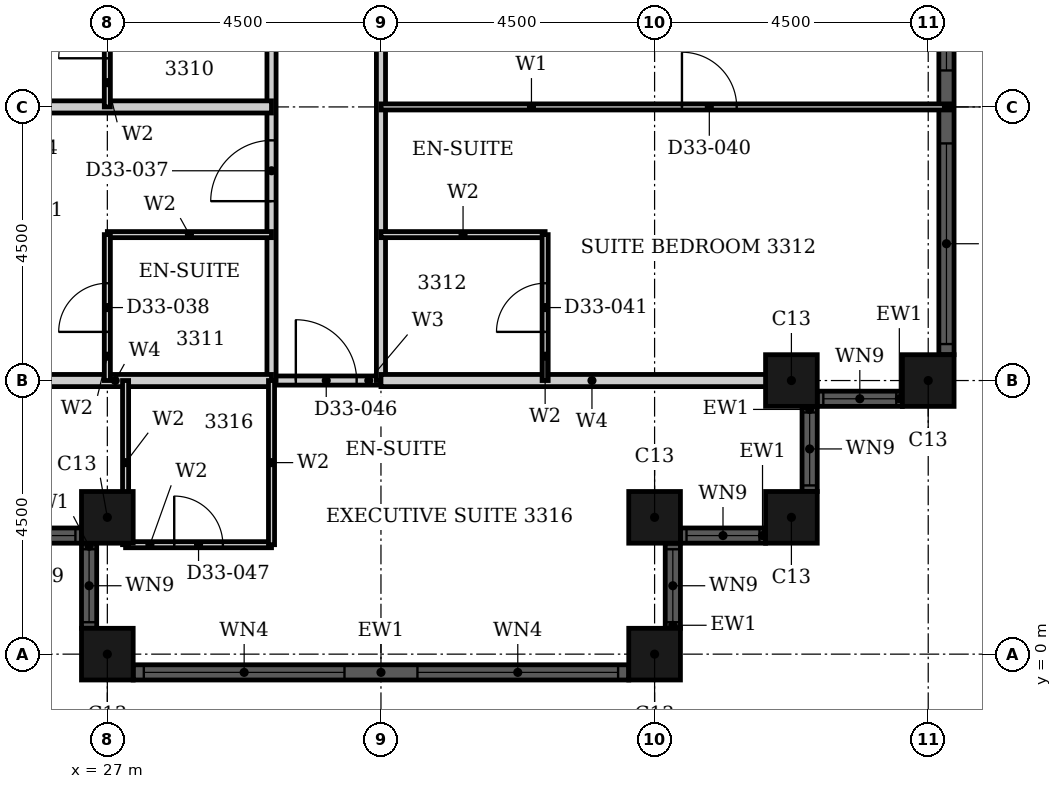
"""IFC4 building model, lengths in metres.
Left out: names, types, materials, properties, quantities, classifications, styles, units other than length and angle.
Written with IfcOpenShell. Run it as: python <this file> out.ifc"""

import sys

from ifc_helpers import new_model, si_unit, direction, frame, frame_2d, origin, origin_2d, place, context, subcontext, project, spatial, rectangle, hollow_rectangle, extrude, element, fill, save


model = new_model("IFC4")
c1 = context("Model", 3, precision=1e-05, world=origin(), true_north=direction((0.0, 1.0)))
c2 = subcontext(c1, "Body", "Model", "MODEL_VIEW")
j1 = project(units=[si_unit("LENGTHUNIT", "METRE"), si_unit("PLANEANGLEUNIT", "RADIAN")], contexts=[c1])
p1 = place(None, origin())
s1 = spatial("IfcSite", under=j1, at=p1, CompositionType="ELEMENT")
p2 = place(p1, origin())
s2 = spatial("IfcBuilding", under=s1, at=p2, CompositionType="ELEMENT")
p3 = place(p2, frame((0.0, 0.0, 133.2)))
s3 = spatial("IfcBuildingStorey", under=s2, at=p3, CompositionType="ELEMENT", Elevation=133.2)
for number, where, z_axis, x_axis in (
    (1, (27.0, 2.25, 0.0), (0.0, 0.0, 1.0), (1.0, 0.0, 0.0)),
    (2, (27.0, 0.0, 0.0), (0.0, 0.0, 1.0), (1.0, 0.0, 0.0)),
    (3, (36.0, 0.0, 0.0), (0.0, 0.0, 1.0), (1.0, 0.0, 0.0)),
    (4, (36.0, 2.25, 0.0), (0.0, 0.0, 1.0), (1.0, 0.0, 0.0)),
    (5, (38.25, 2.25, 0.0), (0.0, 0.0, 1.0), (1.0, 0.0, 0.0)),
    (6, (38.25, 4.5, 0.0), (0.0, 0.0, 1.0), (1.0, 0.0, 0.0)),
    (7, (40.5, 4.5, 0.0), (0.0, 0.0, 1.0), (1.0, 0.0, 0.0)),
):
    element("IfcColumn", number, at=place(p3, frame(where, z_axis=z_axis, x_axis=x_axis)), inside=s3, PredefinedType="COLUMN", context=c2, shape_type="SweptSolid", body=[
        extrude(hollow_rectangle(XDim=0.85, YDim=0.85, WallThickness=0.026, at=origin_2d()), origin(), (0.0, 0.0, 1.0), 3.6),
    ])
p4 = place(p3, frame((25.175, 1.95, 0.0), z_axis=(0.0, 0.0, 1.0), x_axis=(1.0, 0.0, 0.0)))
e8 = element("IfcWall", 8, at=p4, inside=s3, PredefinedType="SOLIDWALL", context=c2, shape_type="SweptSolid", body=[
    extrude(rectangle(XDim=1.4, YDim=0.25, at=frame_2d((0.7, 0.0))), origin(), (0.0, 0.0, 1.0), 3.6),
])
p5 = place(p4, frame((0.1, 0.0, 0.9)))
e9 = element("IfcOpeningElement", 9, at=p5, cuts=e8, PredefinedType="OPENING", context=c2, shape_type="SweptSolid", body=[
    extrude(rectangle(XDim=1.2, YDim=2.08, at=frame_2d((0.6, 1.04))), frame((0.0, 0.135, 0.0), z_axis=(0.0, -1.0, 0.0), x_axis=(1.0, 0.0, 0.0)), (0.0, 0.0, 1.0), 0.27),
])
p6 = place(p3, frame((26.7, 1.825, 0.0), z_axis=(0.0, 0.0, 1.0), x_axis=(0.0, -1.0, 0.0)))
e10 = element("IfcWall", 10, at=p6, inside=s3, PredefinedType="SOLIDWALL", context=c2, shape_type="SweptSolid", body=[
    extrude(rectangle(XDim=1.4, YDim=0.25, at=frame_2d((0.7, 0.0))), origin(), (0.0, 0.0, 1.0), 3.6),
])
p7 = place(p6, frame((0.1, 0.0, 0.9)))
e11 = element("IfcOpeningElement", 11, at=p7, cuts=e10, PredefinedType="OPENING", context=c2, shape_type="SweptSolid", body=[
    extrude(rectangle(XDim=1.2, YDim=2.08, at=frame_2d((0.6, 1.04))), frame((0.0, 0.135, 0.0), z_axis=(0.0, -1.0, 0.0), x_axis=(1.0, 0.0, 0.0)), (0.0, 0.0, 1.0), 0.27),
])
p8 = place(p3, frame((27.425, -0.3, 0.0), z_axis=(0.0, 0.0, 1.0), x_axis=(1.0, 0.0, 0.0)))
e12 = element("IfcWall", 12, at=p8, inside=s3, PredefinedType="SOLIDWALL", context=c2, shape_type="SweptSolid", body=[
    extrude(rectangle(XDim=8.15, YDim=0.25, at=frame_2d((4.075, 0.0))), origin(), (0.0, 0.0, 1.0), 3.6),
])
p9 = place(p8, frame((0.175, 0.0, 0.9)))
e13 = element("IfcOpeningElement", 13, at=p9, cuts=e12, PredefinedType="OPENING", context=c2, shape_type="SweptSolid", body=[
    extrude(rectangle(XDim=3.3, YDim=2.08, at=frame_2d((1.65, 1.04))), frame((0.0, 0.135, 0.0), z_axis=(0.0, -1.0, 0.0), x_axis=(1.0, 0.0, 0.0)), (0.0, 0.0, 1.0), 0.27),
])
p10 = place(p8, frame((4.675, 0.0, 0.9)))
e14 = element("IfcOpeningElement", 14, at=p10, cuts=e12, PredefinedType="OPENING", context=c2, shape_type="SweptSolid", body=[
    extrude(rectangle(XDim=3.3, YDim=2.08, at=frame_2d((1.65, 1.04))), frame((0.0, 0.135, 0.0), z_axis=(0.0, -1.0, 0.0), x_axis=(1.0, 0.0, 0.0)), (0.0, 0.0, 1.0), 0.27),
])
p11 = place(p3, frame((36.3, 0.425, 0.0), z_axis=(0.0, 0.0, 1.0), x_axis=(0.0, 1.0, 0.0)))
e15 = element("IfcWall", 15, at=p11, inside=s3, PredefinedType="SOLIDWALL", context=c2, shape_type="SweptSolid", body=[
    extrude(rectangle(XDim=1.4, YDim=0.25, at=frame_2d((0.7, 0.0))), origin(), (0.0, 0.0, 1.0), 3.6),
])
p12 = place(p11, frame((0.1, 0.0, 0.9)))
e16 = element("IfcOpeningElement", 16, at=p12, cuts=e15, PredefinedType="OPENING", context=c2, shape_type="SweptSolid", body=[
    extrude(rectangle(XDim=1.2, YDim=2.08, at=frame_2d((0.6, 1.04))), frame((0.0, 0.135, 0.0), z_axis=(0.0, -1.0, 0.0), x_axis=(1.0, 0.0, 0.0)), (0.0, 0.0, 1.0), 0.27),
])
p13 = place(p3, frame((36.425, 1.95, 0.0), z_axis=(0.0, 0.0, 1.0), x_axis=(1.0, 0.0, 0.0)))
e17 = element("IfcWall", 17, at=p13, inside=s3, PredefinedType="SOLIDWALL", context=c2, shape_type="SweptSolid", body=[
    extrude(rectangle(XDim=1.4, YDim=0.25, at=frame_2d((0.7, 0.0))), origin(), (0.0, 0.0, 1.0), 3.6),
])
p14 = place(p13, frame((0.1, 0.0, 0.9)))
e18 = element("IfcOpeningElement", 18, at=p14, cuts=e17, PredefinedType="OPENING", context=c2, shape_type="SweptSolid", body=[
    extrude(rectangle(XDim=1.2, YDim=2.08, at=frame_2d((0.6, 1.04))), frame((0.0, 0.135, 0.0), z_axis=(0.0, -1.0, 0.0), x_axis=(1.0, 0.0, 0.0)), (0.0, 0.0, 1.0), 0.27),
])
p15 = place(p3, frame((38.55, 2.675, 0.0), z_axis=(0.0, 0.0, 1.0), x_axis=(0.0, 1.0, 0.0)))
e19 = element("IfcWall", 19, at=p15, inside=s3, PredefinedType="SOLIDWALL", context=c2, shape_type="SweptSolid", body=[
    extrude(rectangle(XDim=1.4, YDim=0.25, at=frame_2d((0.7, 0.0))), origin(), (0.0, 0.0, 1.0), 3.6),
])
p16 = place(p15, frame((0.1, 0.0, 0.9)))
e20 = element("IfcOpeningElement", 20, at=p16, cuts=e19, PredefinedType="OPENING", context=c2, shape_type="SweptSolid", body=[
    extrude(rectangle(XDim=1.2, YDim=2.08, at=frame_2d((0.6, 1.04))), frame((0.0, 0.135, 0.0), z_axis=(0.0, -1.0, 0.0), x_axis=(1.0, 0.0, 0.0)), (0.0, 0.0, 1.0), 0.27),
])
p17 = place(p3, frame((38.675, 4.2, 0.0), z_axis=(0.0, 0.0, 1.0), x_axis=(1.0, 0.0, 0.0)))
e21 = element("IfcWall", 21, at=p17, inside=s3, PredefinedType="SOLIDWALL", context=c2, shape_type="SweptSolid", body=[
    extrude(rectangle(XDim=1.4, YDim=0.25, at=frame_2d((0.7, 0.0))), origin(), (0.0, 0.0, 1.0), 3.6),
])
p18 = place(p17, frame((0.1, 0.0, 0.9)))
e22 = element("IfcOpeningElement", 22, at=p18, cuts=e21, PredefinedType="OPENING", context=c2, shape_type="SweptSolid", body=[
    extrude(rectangle(XDim=1.2, YDim=2.08, at=frame_2d((0.6, 1.04))), frame((0.0, 0.135, 0.0), z_axis=(0.0, -1.0, 0.0), x_axis=(1.0, 0.0, 0.0)), (0.0, 0.0, 1.0), 0.27),
])
p19 = place(p3, frame((40.8, 4.925, 0.0), z_axis=(0.0, 0.0, 1.0), x_axis=(0.0, 1.0, 0.0)))
e23 = element("IfcWall", 23, at=p19, inside=s3, PredefinedType="SOLIDWALL", context=c2, shape_type="SweptSolid", body=[
    extrude(rectangle(XDim=8.15, YDim=0.25, at=frame_2d((4.075, 0.0))), origin(), (0.0, 0.0, 1.0), 3.6),
])
p20 = place(p19, frame((0.175, 0.0, 0.9)))
e24 = element("IfcOpeningElement", 24, at=p20, cuts=e23, PredefinedType="OPENING", context=c2, shape_type="SweptSolid", body=[
    extrude(rectangle(XDim=3.3, YDim=2.08, at=frame_2d((1.65, 1.04))), frame((0.0, 0.135, 0.0), z_axis=(0.0, -1.0, 0.0), x_axis=(1.0, 0.0, 0.0)), (0.0, 0.0, 1.0), 0.27),
])
p21 = place(p19, frame((4.675, 0.0, 0.9)))
e25 = element("IfcOpeningElement", 25, at=p21, cuts=e23, PredefinedType="OPENING", context=c2, shape_type="SweptSolid", body=[
    extrude(rectangle(XDim=3.3, YDim=2.08, at=frame_2d((1.65, 1.04))), frame((0.0, 0.135, 0.0), z_axis=(0.0, -1.0, 0.0), x_axis=(1.0, 0.0, 0.0)), (0.0, 0.0, 1.0), 0.27),
])
p22 = place(p3, frame((29.7, 4.5, 0.0), z_axis=(0.0, 0.0, 1.0), x_axis=(1.0, 0.0, 0.0)))
e26 = element("IfcWall", 26, at=p22, inside=s3, PredefinedType="PARTITIONING", context=c2, shape_type="SweptSolid", body=[
    extrude(rectangle(XDim=1.8, YDim=0.15, at=frame_2d((0.9, 0.0))), origin(), (0.0, 0.0, 1.0), 3.3),
])
p23 = place(p22, frame((0.4, 0.0, 0.0)))
e27 = element("IfcOpeningElement", 27, at=p23, cuts=e26, PredefinedType="OPENING", context=c2, shape_type="SweptSolid", body=[
    extrude(rectangle(XDim=1.0, YDim=2.1, at=frame_2d((0.5, 1.05))), frame((0.0, 0.085, 0.0), z_axis=(0.0, -1.0, 0.0), x_axis=(1.0, 0.0, 0.0)), (0.0, 0.0, 1.0), 0.17),
])
p24 = place(p3, frame((29.7, 4.5, 0.0), z_axis=(0.0, 0.0, 1.0), x_axis=(0.0, 1.0, 0.0)))
e28 = element("IfcWall", 28, at=p24, inside=s3, PredefinedType="PARTITIONING", context=c2, shape_type="SweptSolid", body=[
    extrude(rectangle(XDim=16.2, YDim=0.15, at=frame_2d((8.1, 0.0))), origin(), (0.0, 0.0, 1.0), 3.3),
])
p25 = place(p24, frame((7.45, 0.0, 0.0)))
e29 = element("IfcOpeningElement", 29, at=p25, cuts=e28, PredefinedType="OPENING", context=c2, shape_type="SweptSolid", body=[
    extrude(rectangle(XDim=1.0, YDim=2.1, at=frame_2d((0.5, 1.05))), frame((0.0, 0.085, 0.0), z_axis=(0.0, -1.0, 0.0), x_axis=(1.0, 0.0, 0.0)), (0.0, 0.0, 1.0), 0.17),
])
p26 = place(p24, frame((2.95, 0.0, 0.0)))
e30 = element("IfcOpeningElement", 30, at=p26, cuts=e28, PredefinedType="OPENING", context=c2, shape_type="SweptSolid", body=[
    extrude(rectangle(XDim=1.0, YDim=2.1, at=frame_2d((0.5, 1.05))), frame((0.0, 0.085, 0.0), z_axis=(0.0, -1.0, 0.0), x_axis=(1.0, 0.0, 0.0)), (0.0, 0.0, 1.0), 0.17),
])
p27 = place(p3, frame((31.5, 4.5, 0.0), z_axis=(0.0, 0.0, 1.0), x_axis=(0.0, 1.0, 0.0)))
e31 = element("IfcWall", 31, at=p27, inside=s3, PredefinedType="PARTITIONING", context=c2, shape_type="SweptSolid", body=[
    extrude(rectangle(XDim=16.2, YDim=0.15, at=frame_2d((8.1, 0.0))), origin(), (0.0, 0.0, 1.0), 2.58),
])
p28 = place(p27, frame((6.25, 0.0, 0.0)))
e32 = element("IfcOpeningElement", 32, at=p28, cuts=e31, PredefinedType="OPENING", context=c2, shape_type="SweptSolid", body=[
    extrude(rectangle(XDim=1.0, YDim=2.1, at=frame_2d((0.5, 1.05))), frame((0.0, 0.085, 0.0), z_axis=(0.0, -1.0, 0.0), x_axis=(1.0, 0.0, 0.0)), (0.0, 0.0, 1.0), 0.17),
])
p29 = place(p3, frame((31.5, 9.0, 0.0), z_axis=(0.0, 0.0, 1.0), x_axis=(1.0, 0.0, 0.0)))
e33 = element("IfcWall", 33, at=p29, inside=s3, PredefinedType="PARTITIONING", context=c2, shape_type="SweptSolid", body=[
    extrude(rectangle(XDim=9.365, YDim=0.1, at=frame_2d((4.683, 0.0))), origin(), (0.0, 0.0, 1.0), 3.3),
])
p30 = place(p29, frame((4.95, 0.0, 0.0)))
e34 = element("IfcOpeningElement", 34, at=p30, cuts=e33, PredefinedType="OPENING", context=c2, shape_type="SweptSolid", body=[
    extrude(rectangle(XDim=0.9, YDim=2.1, at=frame_2d((0.45, 1.05))), frame((0.0, 0.06, 0.0), z_axis=(0.0, -1.0, 0.0), x_axis=(1.0, 0.0, 0.0)), (0.0, 0.0, 1.0), 0.12),
])
p31 = place(p3, frame((24.56, 4.5, 0.0), z_axis=(0.0, 0.0, 1.0), x_axis=(1.0, 0.0, 0.0)))
e35 = element("IfcWall", 35, at=p31, inside=s3, PredefinedType="PARTITIONING", context=c2, shape_type="SweptSolid", body=[
    extrude(rectangle(XDim=5.14, YDim=0.2, at=frame_2d((2.57, 0.0))), origin(), (0.0, 0.0, 1.0), 3.3),
])
p32 = place(p3, frame((31.5, 4.5, 0.0), z_axis=(0.0, 0.0, 1.0), x_axis=(1.0, 0.0, 0.0)))
e36 = element("IfcWall", 36, at=p32, inside=s3, PredefinedType="PARTITIONING", context=c2, shape_type="SweptSolid", body=[
    extrude(rectangle(XDim=6.94, YDim=0.2, at=frame_2d((3.47, 0.0))), origin(), (0.0, 0.0, 1.0), 3.3),
])
p33 = place(p3, frame((22.135, 9.0, 0.0), z_axis=(0.0, 0.0, 1.0), x_axis=(1.0, 0.0, 0.0)))
e37 = element("IfcWall", 37, at=p33, inside=s3, PredefinedType="PARTITIONING", context=c2, shape_type="SweptSolid", body=[
    extrude(rectangle(XDim=7.565, YDim=0.2, at=frame_2d((3.782, 0.0))), origin(), (0.0, 0.0, 1.0), 3.3),
])
p34 = place(p3, frame((27.3, 1.8, 0.0), z_axis=(0.0, 0.0, 1.0), x_axis=(1.0, 0.0, 0.0)))
e38 = element("IfcWall", 38, at=p34, inside=s3, PredefinedType="PARTITIONING", context=c2, shape_type="SweptSolid", body=[
    extrude(rectangle(XDim=2.4, YDim=0.1, at=frame_2d((1.2, 0.0))), origin(), (0.0, 0.0, 1.0), 3.3),
])
p35 = place(p34, frame((0.8, 0.0, 0.0)))
e39 = element("IfcOpeningElement", 39, at=p35, cuts=e38, PredefinedType="OPENING", context=c2, shape_type="SweptSolid", body=[
    extrude(rectangle(XDim=0.8, YDim=2.1, at=frame_2d((0.4, 1.05))), frame((0.0, 0.06, 0.0), z_axis=(0.0, -1.0, 0.0), x_axis=(1.0, 0.0, 0.0)), (0.0, 0.0, 1.0), 0.12),
])
for number, where, z_axis, x_axis in (
    (40, (27.0, 6.9, 0.0), (0.0, 0.0, 1.0), (1.0, 0.0, 0.0)),
    (41, (31.5, 6.9, 0.0), (0.0, 0.0, 1.0), (1.0, 0.0, 0.0)),
):
    element("IfcWall", number, at=place(p3, frame(where, z_axis=z_axis, x_axis=x_axis)), inside=s3, PredefinedType="PARTITIONING", context=c2, shape_type="SweptSolid", body=[
        extrude(rectangle(XDim=2.7, YDim=0.1, at=frame_2d((1.35, 0.0))), origin(), (0.0, 0.0, 1.0), 3.3),
    ])
p36 = place(p3, frame((27.0, 9.0, 0.0), z_axis=(0.0, 0.0, 1.0), x_axis=(0.0, 1.0, 0.0)))
e42 = element("IfcWall", 42, at=p36, inside=s3, PredefinedType="PARTITIONING", context=c2, shape_type="SweptSolid", body=[
    extrude(rectangle(XDim=2.4, YDim=0.1, at=frame_2d((1.2, 0.0))), origin(), (0.0, 0.0, 1.0), 2.58),
])
p37 = place(p36, frame((0.8, 0.0, 0.0)))
e43 = element("IfcOpeningElement", 43, at=p37, cuts=e42, PredefinedType="OPENING", context=c2, shape_type="SweptSolid", body=[
    extrude(rectangle(XDim=0.8, YDim=2.1, at=frame_2d((0.4, 1.05))), frame((0.0, 0.06, 0.0), z_axis=(0.0, -1.0, 0.0), x_axis=(1.0, 0.0, 0.0)), (0.0, 0.0, 1.0), 0.12),
])
p38 = place(p3, frame((27.0, 4.5, 0.0), z_axis=(0.0, 0.0, 1.0), x_axis=(0.0, 1.0, 0.0)))
e44 = element("IfcWall", 44, at=p38, inside=s3, PredefinedType="PARTITIONING", context=c2, shape_type="SweptSolid", body=[
    extrude(rectangle(XDim=2.4, YDim=0.1, at=frame_2d((1.2, 0.0))), origin(), (0.0, 0.0, 1.0), 2.58),
])
p39 = place(p38, frame((0.8, 0.0, 0.0)))
e45 = element("IfcOpeningElement", 45, at=p39, cuts=e44, PredefinedType="OPENING", context=c2, shape_type="SweptSolid", body=[
    extrude(rectangle(XDim=0.8, YDim=2.1, at=frame_2d((0.4, 1.05))), frame((0.0, 0.06, 0.0), z_axis=(0.0, -1.0, 0.0), x_axis=(1.0, 0.0, 0.0)), (0.0, 0.0, 1.0), 0.12),
])
for number, where, z_axis, x_axis in (
    (46, (27.3, 1.8, 0.0), (0.0, 0.0, 1.0), (0.0, 1.0, 0.0)),
    (47, (29.7, 1.8, 0.0), (0.0, 0.0, 1.0), (0.0, 1.0, 0.0)),
):
    element("IfcWall", number, at=place(p3, frame(where, z_axis=z_axis, x_axis=x_axis)), inside=s3, PredefinedType="PARTITIONING", context=c2, shape_type="SweptSolid", body=[
        extrude(rectangle(XDim=2.7, YDim=0.1, at=frame_2d((1.35, 0.0))), origin(), (0.0, 0.0, 1.0), 3.3),
    ])
p40 = place(p3, frame((34.2, 4.5, 0.0), z_axis=(0.0, 0.0, 1.0), x_axis=(0.0, 1.0, 0.0)))
e48 = element("IfcWall", 48, at=p40, inside=s3, PredefinedType="PARTITIONING", context=c2, shape_type="SweptSolid", body=[
    extrude(rectangle(XDim=2.4, YDim=0.1, at=frame_2d((1.2, 0.0))), origin(), (0.0, 0.0, 1.0), 3.3),
])
p41 = place(p40, frame((0.8, 0.0, 0.0)))
e49 = element("IfcOpeningElement", 49, at=p41, cuts=e48, PredefinedType="OPENING", context=c2, shape_type="SweptSolid", body=[
    extrude(rectangle(XDim=0.8, YDim=2.1, at=frame_2d((0.4, 1.05))), frame((0.0, 0.06, 0.0), z_axis=(0.0, -1.0, 0.0), x_axis=(1.0, 0.0, 0.0)), (0.0, 0.0, 1.0), 0.12),
])
p42 = place(p5, origin())
e50 = element("IfcWindow", 50, at=p42, inside=s3, PartitioningType="SINGLE_PANEL", PredefinedType="WINDOW", context=c2, shape_type="SweptSolid", body=[
    extrude(rectangle(XDim=1.2, YDim=2.08, at=frame_2d((0.6, 1.04))), frame((0.0, 0.03, 0.0), z_axis=(0.0, -1.0, 0.0), x_axis=(1.0, 0.0, 0.0)), (0.0, 0.0, 1.0), 0.06),
])
fill(e9, e50)
p43 = place(p7, origin())
e51 = element("IfcWindow", 51, at=p43, inside=s3, PartitioningType="SINGLE_PANEL", PredefinedType="WINDOW", context=c2, shape_type="SweptSolid", body=[
    extrude(rectangle(XDim=1.2, YDim=2.08, at=frame_2d((0.6, 1.04))), frame((0.0, 0.03, 0.0), z_axis=(0.0, -1.0, 0.0), x_axis=(1.0, 0.0, 0.0)), (0.0, 0.0, 1.0), 0.06),
])
fill(e11, e51)
p44 = place(p9, origin())
e52 = element("IfcWindow", 52, at=p44, inside=s3, PartitioningType="SINGLE_PANEL", PredefinedType="WINDOW", context=c2, shape_type="SweptSolid", body=[
    extrude(rectangle(XDim=3.3, YDim=2.08, at=frame_2d((1.65, 1.04))), frame((0.0, 0.03, 0.0), z_axis=(0.0, -1.0, 0.0), x_axis=(1.0, 0.0, 0.0)), (0.0, 0.0, 1.0), 0.06),
])
fill(e13, e52)
p45 = place(p10, origin())
e53 = element("IfcWindow", 53, at=p45, inside=s3, PartitioningType="SINGLE_PANEL", PredefinedType="WINDOW", context=c2, shape_type="SweptSolid", body=[
    extrude(rectangle(XDim=3.3, YDim=2.08, at=frame_2d((1.65, 1.04))), frame((0.0, 0.03, 0.0), z_axis=(0.0, -1.0, 0.0), x_axis=(1.0, 0.0, 0.0)), (0.0, 0.0, 1.0), 0.06),
])
fill(e14, e53)
p46 = place(p12, origin())
e54 = element("IfcWindow", 54, at=p46, inside=s3, PartitioningType="SINGLE_PANEL", PredefinedType="WINDOW", context=c2, shape_type="SweptSolid", body=[
    extrude(rectangle(XDim=1.2, YDim=2.08, at=frame_2d((0.6, 1.04))), frame((0.0, 0.03, 0.0), z_axis=(0.0, -1.0, 0.0), x_axis=(1.0, 0.0, 0.0)), (0.0, 0.0, 1.0), 0.06),
])
fill(e16, e54)
p47 = place(p14, origin())
e55 = element("IfcWindow", 55, at=p47, inside=s3, PartitioningType="SINGLE_PANEL", PredefinedType="WINDOW", context=c2, shape_type="SweptSolid", body=[
    extrude(rectangle(XDim=1.2, YDim=2.08, at=frame_2d((0.6, 1.04))), frame((0.0, 0.03, 0.0), z_axis=(0.0, -1.0, 0.0), x_axis=(1.0, 0.0, 0.0)), (0.0, 0.0, 1.0), 0.06),
])
fill(e18, e55)
p48 = place(p16, origin())
e56 = element("IfcWindow", 56, at=p48, inside=s3, PartitioningType="SINGLE_PANEL", PredefinedType="WINDOW", context=c2, shape_type="SweptSolid", body=[
    extrude(rectangle(XDim=1.2, YDim=2.08, at=frame_2d((0.6, 1.04))), frame((0.0, 0.03, 0.0), z_axis=(0.0, -1.0, 0.0), x_axis=(1.0, 0.0, 0.0)), (0.0, 0.0, 1.0), 0.06),
])
fill(e20, e56)
p49 = place(p18, origin())
e57 = element("IfcWindow", 57, at=p49, inside=s3, PartitioningType="SINGLE_PANEL", PredefinedType="WINDOW", context=c2, shape_type="SweptSolid", body=[
    extrude(rectangle(XDim=1.2, YDim=2.08, at=frame_2d((0.6, 1.04))), frame((0.0, 0.03, 0.0), z_axis=(0.0, -1.0, 0.0), x_axis=(1.0, 0.0, 0.0)), (0.0, 0.0, 1.0), 0.06),
])
fill(e22, e57)
p50 = place(p20, origin())
e58 = element("IfcWindow", 58, at=p50, inside=s3, PartitioningType="SINGLE_PANEL", PredefinedType="WINDOW", context=c2, shape_type="SweptSolid", body=[
    extrude(rectangle(XDim=3.3, YDim=2.08, at=frame_2d((1.65, 1.04))), frame((0.0, 0.03, 0.0), z_axis=(0.0, -1.0, 0.0), x_axis=(1.0, 0.0, 0.0)), (0.0, 0.0, 1.0), 0.06),
])
fill(e24, e58)
p51 = place(p21, origin())
e59 = element("IfcWindow", 59, at=p51, inside=s3, PartitioningType="SINGLE_PANEL", PredefinedType="WINDOW", context=c2, shape_type="SweptSolid", body=[
    extrude(rectangle(XDim=3.3, YDim=2.08, at=frame_2d((1.65, 1.04))), frame((0.0, 0.03, 0.0), z_axis=(0.0, -1.0, 0.0), x_axis=(1.0, 0.0, 0.0)), (0.0, 0.0, 1.0), 0.06),
])
fill(e25, e59)
p52 = place(p37, origin())
e60 = element("IfcDoor", 60, at=p52, inside=s3, OperationType="SINGLE_SWING_LEFT", PredefinedType="DOOR", context=c2, shape_type="SweptSolid", body=[
    extrude(rectangle(XDim=0.8, YDim=2.1, at=frame_2d((0.4, 1.05))), frame((0.0, 0.025, 0.0), z_axis=(0.0, -1.0, 0.0), x_axis=(1.0, 0.0, 0.0)), (0.0, 0.0, 1.0), 0.05),
])
fill(e43, e60)
p53 = place(p26, origin())
e61 = element("IfcDoor", 61, at=p53, inside=s3, OperationType="SINGLE_SWING_RIGHT", PredefinedType="DOOR", context=c2, shape_type="SweptSolid", body=[
    extrude(rectangle(XDim=1.0, YDim=2.1, at=frame_2d((0.5, 1.05))), frame((0.0, 0.025, 0.0), z_axis=(0.0, -1.0, 0.0), x_axis=(1.0, 0.0, 0.0)), (0.0, 0.0, 1.0), 0.05),
])
fill(e30, e61)
p54 = place(p39, origin())
e62 = element("IfcDoor", 62, at=p54, inside=s3, OperationType="SINGLE_SWING_RIGHT", PredefinedType="DOOR", context=c2, shape_type="SweptSolid", body=[
    extrude(rectangle(XDim=0.8, YDim=2.1, at=frame_2d((0.4, 1.05))), frame((0.0, 0.025, 0.0), z_axis=(0.0, -1.0, 0.0), x_axis=(1.0, 0.0, 0.0)), (0.0, 0.0, 1.0), 0.05),
])
fill(e45, e62)
p55 = place(p30, origin())
e63 = element("IfcDoor", 63, at=p55, inside=s3, OperationType="SINGLE_SWING_RIGHT", PredefinedType="DOOR", context=c2, shape_type="SweptSolid", body=[
    extrude(rectangle(XDim=0.9, YDim=2.1, at=frame_2d((0.45, 1.05))), frame((0.0, 0.025, 0.0), z_axis=(0.0, -1.0, 0.0), x_axis=(1.0, 0.0, 0.0)), (0.0, 0.0, 1.0), 0.05),
])
fill(e34, e63)
p56 = place(p41, origin())
e64 = element("IfcDoor", 64, at=p56, inside=s3, OperationType="SINGLE_SWING_RIGHT", PredefinedType="DOOR", context=c2, shape_type="SweptSolid", body=[
    extrude(rectangle(XDim=0.8, YDim=2.1, at=frame_2d((0.4, 1.05))), frame((0.0, 0.025, 0.0), z_axis=(0.0, -1.0, 0.0), x_axis=(1.0, 0.0, 0.0)), (0.0, 0.0, 1.0), 0.05),
])
fill(e49, e64)
p57 = place(p23, origin())
e65 = element("IfcDoor", 65, at=p57, inside=s3, OperationType="SINGLE_SWING_LEFT", PredefinedType="DOOR", context=c2, shape_type="SweptSolid", body=[
    extrude(rectangle(XDim=1.0, YDim=2.1, at=frame_2d((0.5, 1.05))), frame((0.0, 0.025, 0.0), z_axis=(0.0, -1.0, 0.0), x_axis=(1.0, 0.0, 0.0)), (0.0, 0.0, 1.0), 0.05),
])
fill(e27, e65)
p58 = place(p35, origin())
e66 = element("IfcDoor", 66, at=p58, inside=s3, OperationType="SINGLE_SWING_RIGHT", PredefinedType="DOOR", context=c2, shape_type="SweptSolid", body=[
    extrude(rectangle(XDim=0.8, YDim=2.1, at=frame_2d((0.4, 1.05))), frame((0.0, 0.025, 0.0), z_axis=(0.0, -1.0, 0.0), x_axis=(1.0, 0.0, 0.0)), (0.0, 0.0, 1.0), 0.05),
])
fill(e39, e66)
save(model, sys.argv[1])
